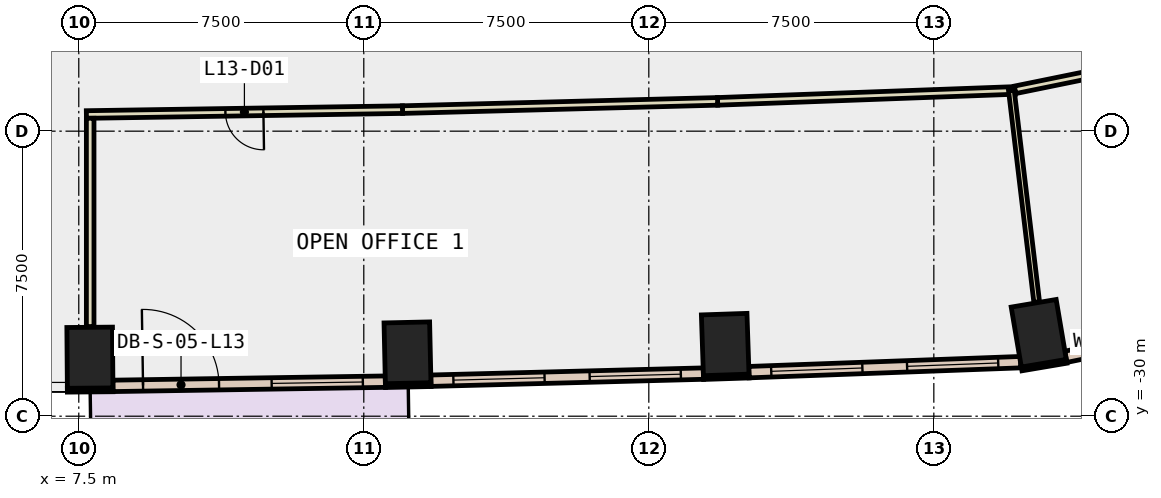
"""IFC4 building model, lengths in metres.
Left out: names, types, materials, properties, quantities, classifications, styles, units other than length and angle.
Written with IfcOpenShell. Run it as: python <this file> out.ifc"""

import sys

from ifc_helpers import new_model, si_unit, direction, frame, frame_2d, origin, origin_2d, place, context, subcontext, project, spatial, rectangle, extrude, element, fill, save


model = new_model("IFC4")
c1 = context("Model", 3, precision=1e-05, world=origin(), true_north=direction((0.0, 1.0)))
c2 = subcontext(c1, "Body", "Model", "MODEL_VIEW")
j1 = project(units=[si_unit("LENGTHUNIT", "METRE"), si_unit("PLANEANGLEUNIT", "RADIAN")], contexts=[c1])
p1 = place(None, origin())
s1 = spatial("IfcSite", under=j1, at=p1, CompositionType="ELEMENT")
p2 = place(p1, origin())
s2 = spatial("IfcBuilding", under=s1, at=p2, CompositionType="ELEMENT")
p3 = place(p2, frame((0.0, 0.0, 64.4)))
s3 = spatial("IfcBuildingStorey", under=s2, at=p3, CompositionType="ELEMENT", Elevation=64.4)
for number, where, z_axis, x_axis in (
    (1, (7.793, -28.461, -0.4), (0.0, 0.0, 1.0), (1.0, 0.008, 0.0)),
    (2, (16.15, -28.332, -0.4), (0.0, 0.0, 1.0), (1.0, 0.022, 0.0)),
    (3, (24.51, -28.114, -0.4), (0.0, 0.0, 1.0), (0.999, 0.034, 0.0)),
    (4, (32.761, -27.818, -0.4), (0.0, 0.0, 1.0), (0.986, 0.167, 0.0)),
):
    element("IfcColumn", number, at=place(p3, frame(where, z_axis=z_axis, x_axis=x_axis)), inside=s3, PredefinedType="COLUMN", context=c2, shape_type="SweptSolid", body=[
        extrude(rectangle(XDim=1.2, YDim=1.6, at=origin_2d()), origin(), (0.0, 0.0, 1.0), 4.2),
    ])
p4 = place(p3, frame((7.2, -29.316, 0.0), z_axis=(0.0, 0.0, 1.0), x_axis=(0.999965208912, 0.008341520563, 0.0)))
e5 = element("IfcWall", 5, at=p4, inside=s3, PredefinedType="STANDARD", context=c2, shape_type="SweptSolid", body=[
    extrude(rectangle(XDim=1.2, YDim=0.1, at=frame_2d((0.6, 0.0))), origin(), (0.0, 0.0, 1.0), 3.8),
])
p5 = place(p3, frame((15.569, -29.195, 0.0), z_axis=(0.0, 0.0, 1.0), x_axis=(0.999763115755, 0.021764934565, 0.0)))
e6 = element("IfcWall", 6, at=p5, inside=s3, PredefinedType="STANDARD", context=c2, shape_type="SweptSolid", body=[
    extrude(rectangle(XDim=1.2, YDim=0.1, at=frame_2d((0.6, 0.0))), origin(), (0.0, 0.0, 1.0), 3.8),
])
for number, where, z_axis, x_axis in (
    (7, (23.939, -28.983, 0.0), (0.0, 0.0, 1.0), (0.999, 0.033, 0.0)),
    (8, (32.311, -28.756, 0.0), (0.0, 0.0, 1.0), (0.986, 0.167, 0.0)),
):
    element("IfcWall", number, at=place(p3, frame(where, z_axis=z_axis, x_axis=x_axis)), inside=s3, PredefinedType="STANDARD", context=c2, shape_type="SweptSolid", body=[
        extrude(rectangle(XDim=1.2, YDim=0.1, at=frame_2d((0.6, 0.0))), origin(), (0.0, 0.0, 1.0), 3.8),
    ])
p6 = place(p3, frame((8.398, -29.202, 0.0), z_axis=(0.0, 0.0, 1.0), x_axis=(0.99988053916, 0.015456629942, 0.0)))
e9 = element("IfcWall", 9, at=p6, inside=s3, PredefinedType="STANDARD", context=c2, shape_type="SweptSolid", body=[
    extrude(rectangle(XDim=7.171, YDim=0.3, at=frame_2d((3.585, 0.0))), origin(), (0.0, 0.0, 1.0), 3.8),
])
p7 = place(p6, frame((0.793, 0.0, 0.0)))
e10 = element("IfcOpeningElement", 10, at=p7, cuts=e9, PredefinedType="OPENING", context=c2, shape_type="SweptSolid", body=[
    extrude(rectangle(XDim=2.0, YDim=2.4, at=frame_2d((1.0, 1.2))), frame((0.0, 0.16, 0.0), z_axis=(0.0, -1.0, 0.0), x_axis=(1.0, 0.0, 0.0)), (0.0, 0.0, 1.0), 0.32),
])
p8 = place(p6, frame((4.178, 0.0, 0.9)))
e11 = element("IfcOpeningElement", 11, at=p8, cuts=e9, PredefinedType="OPENING", context=c2, shape_type="SweptSolid", body=[
    extrude(rectangle(XDim=2.4, YDim=2.6, at=frame_2d((1.2, 1.3))), frame((0.0, 0.16, 0.0), z_axis=(0.0, -1.0, 0.0), x_axis=(1.0, 0.0, 0.0)), (0.0, 0.0, 1.0), 0.32),
])
p9 = place(p3, frame((16.765, -29.066, 0.0), z_axis=(0.0, 0.0, 1.0), x_axis=(0.999660132619, 0.026069508106, 0.0)))
e12 = element("IfcWall", 12, at=p9, inside=s3, PredefinedType="STANDARD", context=c2, shape_type="SweptSolid", body=[
    extrude(rectangle(XDim=7.174, YDim=0.3, at=frame_2d((3.587, 0.0))), origin(), (0.0, 0.0, 1.0), 3.8),
])
p10 = place(p9, frame((0.593, 0.0, 0.9)))
e13 = element("IfcOpeningElement", 13, at=p10, cuts=e12, PredefinedType="OPENING", context=c2, shape_type="SweptSolid", body=[
    extrude(rectangle(XDim=2.4, YDim=2.6, at=frame_2d((1.2, 1.3))), frame((0.0, 0.16, 0.0), z_axis=(0.0, -1.0, 0.0), x_axis=(1.0, 0.0, 0.0)), (0.0, 0.0, 1.0), 0.32),
])
p11 = place(p9, frame((4.18, 0.0, 0.9)))
e14 = element("IfcOpeningElement", 14, at=p11, cuts=e12, PredefinedType="OPENING", context=c2, shape_type="SweptSolid", body=[
    extrude(rectangle(XDim=2.4, YDim=2.6, at=frame_2d((1.2, 1.3))), frame((0.0, 0.16, 0.0), z_axis=(0.0, -1.0, 0.0), x_axis=(1.0, 0.0, 0.0)), (0.0, 0.0, 1.0), 0.32),
])
p12 = place(p3, frame((25.134, -28.841, 0.0), z_axis=(0.0, 0.0, 1.0), x_axis=(0.999322852286, 0.036794522671, 0.0)))
e15 = element("IfcWall", 15, at=p12, inside=s3, PredefinedType="STANDARD", context=c2, shape_type="SweptSolid", body=[
    extrude(rectangle(XDim=7.153, YDim=0.3, at=frame_2d((3.576, 0.0))), origin(), (0.0, 0.0, 1.0), 3.8),
])
p13 = place(p12, frame((0.588, 0.0, 0.9)))
e16 = element("IfcOpeningElement", 16, at=p13, cuts=e15, PredefinedType="OPENING", context=c2, shape_type="SweptSolid", body=[
    extrude(rectangle(XDim=2.4, YDim=2.6, at=frame_2d((1.2, 1.3))), frame((0.0, 0.16, 0.0), z_axis=(0.0, -1.0, 0.0), x_axis=(1.0, 0.0, 0.0)), (0.0, 0.0, 1.0), 0.32),
])
p14 = place(p12, frame((4.165, 0.0, 0.9)))
e17 = element("IfcOpeningElement", 17, at=p14, cuts=e15, PredefinedType="OPENING", context=c2, shape_type="SweptSolid", body=[
    extrude(rectangle(XDim=2.4, YDim=2.6, at=frame_2d((1.2, 1.3))), frame((0.0, 0.16, 0.0), z_axis=(0.0, -1.0, 0.0), x_axis=(1.0, 0.0, 0.0)), (0.0, 0.0, 1.0), 0.32),
])
p15 = place(p3, frame((33.473, -28.437, 0.0), z_axis=(0.0, 0.0, 1.0), x_axis=(0.979824229846, 0.199861148317, 0.0)))
e18 = element("IfcWall", 18, at=p15, inside=s3, PredefinedType="STANDARD", context=c2, shape_type="SweptSolid", body=[
    extrude(rectangle(XDim=3.822, YDim=0.3, at=frame_2d((1.911, 0.0))), origin(), (0.0, 0.0, 1.0), 3.8),
])
p16 = place(p15, frame((1.211, 0.0, 0.9)))
e19 = element("IfcOpeningElement", 19, at=p16, cuts=e18, PredefinedType="OPENING", context=c2, shape_type="SweptSolid", body=[
    extrude(rectangle(XDim=1.4, YDim=2.6, at=frame_2d((0.7, 1.3))), frame((0.0, 0.16, 0.0), z_axis=(0.0, -1.0, 0.0), x_axis=(1.0, 0.0, 0.0)), (0.0, 0.0, 1.0), 0.32),
])
p17 = place(p3, frame((32.141, -21.428, 0.0), z_axis=(0.0, 0.0, 1.0), x_axis=(-0.999324021202, -0.036762761723, 0.0)))
e20 = element("IfcWall", 20, at=p17, inside=s3, PredefinedType="PARTITIONING", context=c2, shape_type="SweptSolid", body=[
    extrude(rectangle(XDim=7.836, YDim=0.2, at=frame_2d((3.918, 0.0))), origin(), (0.0, 0.0, 1.0), 3.8),
])
p18 = place(p3, frame((24.31, -21.716, 0.0), z_axis=(0.0, 0.0, 1.0), x_axis=(-0.999657616542, -0.02616581148, 0.0)))
e21 = element("IfcWall", 21, at=p18, inside=s3, PredefinedType="PARTITIONING", context=c2, shape_type="SweptSolid", body=[
    extrude(rectangle(XDim=8.295, YDim=0.2, at=frame_2d((4.147, 0.0))), origin(), (0.0, 0.0, 1.0), 3.8),
])
p19 = place(p3, frame((16.018, -21.933, 0.0), z_axis=(0.0, 0.0, 1.0), x_axis=(-0.999879942341, -0.015495189738, 0.0)))
e22 = element("IfcWall", 22, at=p19, inside=s3, PredefinedType="PARTITIONING", context=c2, shape_type="SweptSolid", body=[
    extrude(rectangle(XDim=8.319, YDim=0.2, at=frame_2d((4.16, 0.0))), origin(), (0.0, 0.0, 1.0), 3.8),
])
p20 = place(p19, frame((3.66, 0.0, 0.0)))
e23 = element("IfcOpeningElement", 23, at=p20, cuts=e22, PredefinedType="OPENING", context=c2, shape_type="SweptSolid", body=[
    extrude(rectangle(XDim=1.0, YDim=2.1, at=frame_2d((0.5, 1.05))), frame((0.0, 0.11, 0.0), z_axis=(0.0, -1.0, 0.0), x_axis=(1.0, 0.0, 0.0)), (0.0, 0.0, 1.0), 0.22),
])
p21 = place(p3, frame((34.523, -20.926, 0.0), z_axis=(0.0, 0.0, 1.0), x_axis=(-0.979840552367, -0.199781110063, 0.0)))
e24 = element("IfcWall", 24, at=p21, inside=s3, PredefinedType="PARTITIONING", context=c2, shape_type="SweptSolid", body=[
    extrude(rectangle(XDim=2.433, YDim=0.2, at=frame_2d((1.217, 0.0))), origin(), (0.0, 0.0, 1.0), 3.8),
])
p22 = place(p3, frame((7.8, -22.16, 0.0), z_axis=(0.0, 0.0, 1.0), x_axis=(0.0, -1.0, 0.0)))
e25 = element("IfcWall", 25, at=p22, inside=s3, PredefinedType="PARTITIONING", context=c2, shape_type="SweptSolid", body=[
    extrude(rectangle(XDim=5.481, YDim=0.2, at=frame_2d((2.741, 0.0))), origin(), (0.0, 0.0, 1.0), 3.8),
])
p23 = place(p3, frame((32.041, -21.432, 0.0), z_axis=(0.0, 0.0, 1.0), x_axis=(0.118848018273, -0.992912457648, 0.0)))
e26 = element("IfcWall", 26, at=p23, inside=s3, PredefinedType="PARTITIONING", context=c2, shape_type="SweptSolid", body=[
    extrude(rectangle(XDim=5.604, YDim=0.15, at=frame_2d((2.802, 0.0))), origin(), (0.0, 0.0, 1.0), 3.8),
])
p24 = place(p7, origin())
e27 = element("IfcDoor", 27, at=p24, inside=s3, OperationType="SLIDING_TO_LEFT", PredefinedType="DOOR", context=c2, shape_type="SweptSolid", body=[
    extrude(rectangle(XDim=2.0, YDim=2.4, at=frame_2d((1.0, 1.2))), frame((0.0, 0.025, 0.0), z_axis=(0.0, -1.0, 0.0), x_axis=(1.0, 0.0, 0.0)), (0.0, 0.0, 1.0), 0.05),
])
fill(e10, e27)
p25 = place(p8, origin())
e28 = element("IfcWindow", 28, at=p25, inside=s3, PartitioningType="SINGLE_PANEL", PredefinedType="WINDOW", context=c2, shape_type="SweptSolid", body=[
    extrude(rectangle(XDim=2.4, YDim=2.6, at=frame_2d((1.2, 1.3))), frame((0.0, 0.03, 0.0), z_axis=(0.0, -1.0, 0.0), x_axis=(1.0, 0.0, 0.0)), (0.0, 0.0, 1.0), 0.06),
])
fill(e11, e28)
p26 = place(p10, origin())
e29 = element("IfcWindow", 29, at=p26, inside=s3, PartitioningType="SINGLE_PANEL", PredefinedType="WINDOW", context=c2, shape_type="SweptSolid", body=[
    extrude(rectangle(XDim=2.4, YDim=2.6, at=frame_2d((1.2, 1.3))), frame((0.0, 0.03, 0.0), z_axis=(0.0, -1.0, 0.0), x_axis=(1.0, 0.0, 0.0)), (0.0, 0.0, 1.0), 0.06),
])
fill(e13, e29)
p27 = place(p11, origin())
e30 = element("IfcWindow", 30, at=p27, inside=s3, PartitioningType="SINGLE_PANEL", PredefinedType="WINDOW", context=c2, shape_type="SweptSolid", body=[
    extrude(rectangle(XDim=2.4, YDim=2.6, at=frame_2d((1.2, 1.3))), frame((0.0, 0.03, 0.0), z_axis=(0.0, -1.0, 0.0), x_axis=(1.0, 0.0, 0.0)), (0.0, 0.0, 1.0), 0.06),
])
fill(e14, e30)
p28 = place(p13, origin())
e31 = element("IfcWindow", 31, at=p28, inside=s3, PartitioningType="SINGLE_PANEL", PredefinedType="WINDOW", context=c2, shape_type="SweptSolid", body=[
    extrude(rectangle(XDim=2.4, YDim=2.6, at=frame_2d((1.2, 1.3))), frame((0.0, 0.03, 0.0), z_axis=(0.0, -1.0, 0.0), x_axis=(1.0, 0.0, 0.0)), (0.0, 0.0, 1.0), 0.06),
])
fill(e16, e31)
p29 = place(p14, origin())
e32 = element("IfcWindow", 32, at=p29, inside=s3, PartitioningType="SINGLE_PANEL", PredefinedType="WINDOW", context=c2, shape_type="SweptSolid", body=[
    extrude(rectangle(XDim=2.4, YDim=2.6, at=frame_2d((1.2, 1.3))), frame((0.0, 0.03, 0.0), z_axis=(0.0, -1.0, 0.0), x_axis=(1.0, 0.0, 0.0)), (0.0, 0.0, 1.0), 0.06),
])
fill(e17, e32)
p30 = place(p20, origin())
e33 = element("IfcDoor", 33, at=p30, inside=s3, OperationType="SINGLE_SWING_LEFT", PredefinedType="DOOR", context=c2, shape_type="SweptSolid", body=[
    extrude(rectangle(XDim=1.0, YDim=2.1, at=frame_2d((0.5, 1.05))), frame((0.0, 0.025, 0.0), z_axis=(0.0, -1.0, 0.0), x_axis=(1.0, 0.0, 0.0)), (0.0, 0.0, 1.0), 0.05),
])
fill(e23, e33)
save(model, sys.argv[1])
